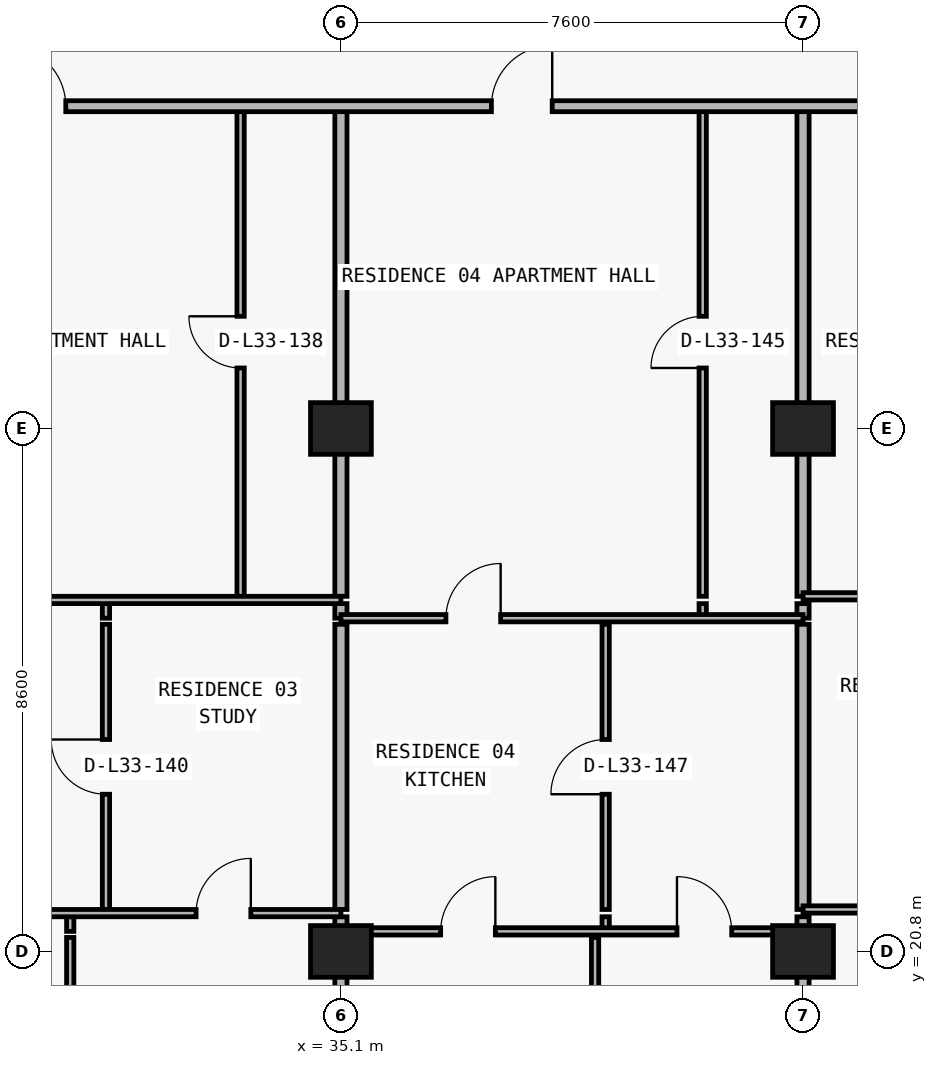
"""IFC4 building model, lengths in metres.
Left out: names, types, materials, properties, quantities, classifications, styles, units other than length and angle.
Written with IfcOpenShell. Run it as: python <this file> out.ifc"""

import sys

from ifc_helpers import new_model, si_unit, direction, frame, frame_2d, origin, origin_2d, place, context, subcontext, project, spatial, rectangle, extrude, element, fill, save


model = new_model("IFC4")
c1 = context("Model", 3, precision=1e-05, world=origin(), true_north=direction((0.0, 1.0)))
c2 = subcontext(c1, "Body", "Model", "MODEL_VIEW")
j1 = project(units=[si_unit("LENGTHUNIT", "METRE"), si_unit("PLANEANGLEUNIT", "RADIAN")], contexts=[c1])
p1 = place(None, origin())
s1 = spatial("IfcSite", under=j1, at=p1, CompositionType="ELEMENT")
p2 = place(p1, origin())
s2 = spatial("IfcBuilding", under=s1, at=p2, CompositionType="ELEMENT")
p3 = place(p2, frame((0.0, 0.0, 122.4)))
s3 = spatial("IfcBuildingStorey", under=s2, at=p3, CompositionType="ELEMENT", Elevation=122.4)
for number, where, z_axis, x_axis in (
    (1, (35.1, 20.8, 0.0), (0.0, 0.0, 1.0), (1.0, 0.0, 0.0)),
    (2, (42.7, 20.8, 0.0), (0.0, 0.0, 1.0), (1.0, 0.0, 0.0)),
    (3, (35.1, 29.4, 0.0), (0.0, 0.0, 1.0), (1.0, 0.0, 0.0)),
    (4, (42.7, 29.4, 0.0), (0.0, 0.0, 1.0), (1.0, 0.0, 0.0)),
):
    element("IfcColumn", number, at=place(p3, frame(where, z_axis=z_axis, x_axis=x_axis)), inside=s3, PredefinedType="COLUMN", context=c2, shape_type="SweptSolid", body=[
        extrude(rectangle(XDim=1.0, YDim=0.85, at=origin_2d()), origin(), (0.0, 0.0, 1.0), 3.05),
    ])
p4 = place(p3, frame((30.648, 8.84, 0.0), z_axis=(0.0, 0.0, 1.0), x_axis=(0.0, 1.0, 0.0)))
e5 = element("IfcWall", 5, at=p4, inside=s3, PredefinedType="PARTITIONING", context=c2, shape_type="SweptSolid", body=[
    extrude(rectangle(XDim=12.19, YDim=0.12, at=frame_2d((6.095, 0.0))), origin(), (0.0, 0.0, 1.0), 3.05),
])
p5 = place(p3, frame((30.648, 21.13, 0.0), z_axis=(0.0, 0.0, 1.0), x_axis=(0.0, 1.0, 0.0)))
e6 = element("IfcWall", 6, at=p5, inside=s3, PredefinedType="PARTITIONING", context=c2, shape_type="SweptSolid", body=[
    extrude(rectangle(XDim=0.24, YDim=0.12, at=frame_2d((0.12, 0.0))), origin(), (0.0, 0.0, 1.0), 3.05),
])
p6 = place(p3, frame((31.236, 21.49, 0.0), z_axis=(0.0, 0.0, 1.0), x_axis=(0.0, 1.0, 0.0)))
e7 = element("IfcWall", 7, at=p6, inside=s3, PredefinedType="PARTITIONING", context=c2, shape_type="SweptSolid", body=[
    extrude(rectangle(XDim=4.69, YDim=0.12, at=frame_2d((2.345, 0.0))), origin(), (0.0, 0.0, 1.0), 3.05),
])
p7 = place(p6, frame((1.895, 0.0, 0.0)))
e8 = element("IfcOpeningElement", 8, at=p7, cuts=e7, PredefinedType="OPENING", context=c2, shape_type="SweptSolid", body=[
    extrude(rectangle(XDim=0.9, YDim=2.15, at=frame_2d((0.45, 1.075))), frame((0.0, 0.07, 0.0), z_axis=(0.0, -1.0, 0.0), x_axis=(1.0, 0.0, 0.0)), (0.0, 0.0, 1.0), 0.14),
])
p8 = place(p3, frame((31.236, 26.28, 0.0), z_axis=(0.0, 0.0, 1.0), x_axis=(0.0, 1.0, 0.0)))
e9 = element("IfcWall", 9, at=p8, inside=s3, PredefinedType="PARTITIONING", context=c2, shape_type="SweptSolid", body=[
    extrude(rectangle(XDim=0.24, YDim=0.12, at=frame_2d((0.12, 0.0))), origin(), (0.0, 0.0, 1.0), 3.05),
])
p9 = place(p3, frame((33.45, 26.64, 0.0), z_axis=(0.0, 0.0, 1.0), x_axis=(0.0, 1.0, 0.0)))
e10 = element("IfcWall", 10, at=p9, inside=s3, PredefinedType="PARTITIONING", context=c2, shape_type="SweptSolid", body=[
    extrude(rectangle(XDim=8.06, YDim=0.12, at=frame_2d((4.03, 0.0))), origin(), (0.0, 0.0, 1.0), 3.05),
])
p10 = place(p9, frame((3.755, 0.0, 0.0)))
e11 = element("IfcOpeningElement", 11, at=p10, cuts=e10, PredefinedType="OPENING", context=c2, shape_type="SweptSolid", body=[
    extrude(rectangle(XDim=0.85, YDim=2.1, at=frame_2d((0.425, 1.05))), frame((0.0, 0.07, 0.0), z_axis=(0.0, -1.0, 0.0), x_axis=(1.0, 0.0, 0.0)), (0.0, 0.0, 1.0), 0.14),
])
p11 = place(p3, frame((35.1, 8.84, 0.0), z_axis=(0.0, 0.0, 1.0), x_axis=(0.0, 1.0, 0.0)))
e12 = element("IfcWall", 12, at=p11, inside=s3, PredefinedType="PARTITIONING", context=c2, shape_type="SweptSolid", body=[
    extrude(rectangle(XDim=12.19, YDim=0.2, at=frame_2d((6.095, 0.0))), origin(), (0.0, 0.0, 1.0), 2.174),
])
p12 = place(p3, frame((35.1, 21.13, 0.0), z_axis=(0.0, 0.0, 1.0), x_axis=(0.0, 1.0, 0.0)))
e13 = element("IfcWall", 13, at=p12, inside=s3, PredefinedType="PARTITIONING", context=c2, shape_type="SweptSolid", body=[
    extrude(rectangle(XDim=0.24, YDim=0.2, at=frame_2d((0.12, 0.0))), origin(), (0.0, 0.0, 1.0), 2.174),
])
p13 = place(p3, frame((35.1, 21.49, 0.0), z_axis=(0.0, 0.0, 1.0), x_axis=(0.0, 1.0, 0.0)))
e14 = element("IfcWall", 14, at=p13, inside=s3, PredefinedType="PARTITIONING", context=c2, shape_type="SweptSolid", body=[
    extrude(rectangle(XDim=4.69, YDim=0.2, at=frame_2d((2.345, 0.0))), origin(), (0.0, 0.0, 1.0), 2.174),
])
p14 = place(p3, frame((35.1, 26.28, 0.0), z_axis=(0.0, 0.0, 1.0), x_axis=(0.0, 1.0, 0.0)))
e15 = element("IfcWall", 15, at=p14, inside=s3, PredefinedType="PARTITIONING", context=c2, shape_type="SweptSolid", body=[
    extrude(rectangle(XDim=0.24, YDim=0.2, at=frame_2d((0.12, 0.0))), origin(), (0.0, 0.0, 1.0), 2.174),
])
p15 = place(p3, frame((35.1, 26.64, 0.0), z_axis=(0.0, 0.0, 1.0), x_axis=(0.0, 1.0, 0.0)))
e16 = element("IfcWall", 16, at=p15, inside=s3, PredefinedType="PARTITIONING", context=c2, shape_type="SweptSolid", body=[
    extrude(rectangle(XDim=8.06, YDim=0.2, at=frame_2d((4.03, 0.0))), origin(), (0.0, 0.0, 1.0), 2.174),
])
p16 = place(p3, frame((39.28, 8.84, 0.0), z_axis=(0.0, 0.0, 1.0), x_axis=(0.0, 1.0, 0.0)))
e17 = element("IfcWall", 17, at=p16, inside=s3, PredefinedType="PARTITIONING", context=c2, shape_type="SweptSolid", body=[
    extrude(rectangle(XDim=12.19, YDim=0.12, at=frame_2d((6.095, 0.0))), origin(), (0.0, 0.0, 1.0), 3.05),
])
p17 = place(p3, frame((39.454, 21.13, 0.0), z_axis=(0.0, 0.0, 1.0), x_axis=(0.0, 1.0, 0.0)))
e18 = element("IfcWall", 18, at=p17, inside=s3, PredefinedType="PARTITIONING", context=c2, shape_type="SweptSolid", body=[
    extrude(rectangle(XDim=0.24, YDim=0.12, at=frame_2d((0.12, 0.0))), origin(), (0.0, 0.0, 1.0), 3.05),
])
p18 = place(p3, frame((39.454, 21.49, 0.0), z_axis=(0.0, 0.0, 1.0), x_axis=(0.0, 1.0, 0.0)))
e19 = element("IfcWall", 19, at=p18, inside=s3, PredefinedType="PARTITIONING", context=c2, shape_type="SweptSolid", body=[
    extrude(rectangle(XDim=4.69, YDim=0.12, at=frame_2d((2.345, 0.0))), origin(), (0.0, 0.0, 1.0), 3.05),
])
p19 = place(p18, frame((1.895, 0.0, 0.0)))
e20 = element("IfcOpeningElement", 20, at=p19, cuts=e19, PredefinedType="OPENING", context=c2, shape_type="SweptSolid", body=[
    extrude(rectangle(XDim=0.9, YDim=2.15, at=frame_2d((0.45, 1.075))), frame((0.0, 0.07, 0.0), z_axis=(0.0, -1.0, 0.0), x_axis=(1.0, 0.0, 0.0)), (0.0, 0.0, 1.0), 0.14),
])
p20 = place(p3, frame((41.05, 26.28, 0.0), z_axis=(0.0, 0.0, 1.0), x_axis=(0.0, 1.0, 0.0)))
e21 = element("IfcWall", 21, at=p20, inside=s3, PredefinedType="PARTITIONING", context=c2, shape_type="SweptSolid", body=[
    extrude(rectangle(XDim=0.24, YDim=0.12, at=frame_2d((0.12, 0.0))), origin(), (0.0, 0.0, 1.0), 2.679),
])
p21 = place(p3, frame((41.05, 26.64, 0.0), z_axis=(0.0, 0.0, 1.0), x_axis=(0.0, 1.0, 0.0)))
e22 = element("IfcWall", 22, at=p21, inside=s3, PredefinedType="PARTITIONING", context=c2, shape_type="SweptSolid", body=[
    extrude(rectangle(XDim=8.06, YDim=0.12, at=frame_2d((4.03, 0.0))), origin(), (0.0, 0.0, 1.0), 2.679),
])
p22 = place(p21, frame((3.755, 0.0, 0.0)))
e23 = element("IfcOpeningElement", 23, at=p22, cuts=e22, PredefinedType="OPENING", context=c2, shape_type="SweptSolid", body=[
    extrude(rectangle(XDim=0.85, YDim=2.1, at=frame_2d((0.425, 1.05))), frame((0.0, 0.07, 0.0), z_axis=(0.0, -1.0, 0.0), x_axis=(1.0, 0.0, 0.0)), (0.0, 0.0, 1.0), 0.14),
])
p23 = place(p3, frame((42.7, 8.84, 0.0), z_axis=(0.0, 0.0, 1.0), x_axis=(0.0, 1.0, 0.0)))
e24 = element("IfcWall", 24, at=p23, inside=s3, PredefinedType="PARTITIONING", context=c2, shape_type="SweptSolid", body=[
    extrude(rectangle(XDim=12.19, YDim=0.2, at=frame_2d((6.095, 0.0))), origin(), (0.0, 0.0, 1.0), 2.174),
])
p24 = place(p3, frame((42.7, 21.13, 0.0), z_axis=(0.0, 0.0, 1.0), x_axis=(0.0, 1.0, 0.0)))
e25 = element("IfcWall", 25, at=p24, inside=s3, PredefinedType="PARTITIONING", context=c2, shape_type="SweptSolid", body=[
    extrude(rectangle(XDim=0.24, YDim=0.2, at=frame_2d((0.12, 0.0))), origin(), (0.0, 0.0, 1.0), 2.174),
])
p25 = place(p3, frame((42.7, 21.49, 0.0), z_axis=(0.0, 0.0, 1.0), x_axis=(0.0, 1.0, 0.0)))
e26 = element("IfcWall", 26, at=p25, inside=s3, PredefinedType="PARTITIONING", context=c2, shape_type="SweptSolid", body=[
    extrude(rectangle(XDim=4.69, YDim=0.2, at=frame_2d((2.345, 0.0))), origin(), (0.0, 0.0, 1.0), 2.174),
])
p26 = place(p3, frame((42.7, 26.28, 0.0), z_axis=(0.0, 0.0, 1.0), x_axis=(0.0, 1.0, 0.0)))
e27 = element("IfcWall", 27, at=p26, inside=s3, PredefinedType="PARTITIONING", context=c2, shape_type="SweptSolid", body=[
    extrude(rectangle(XDim=0.24, YDim=0.2, at=frame_2d((0.12, 0.0))), origin(), (0.0, 0.0, 1.0), 2.174),
])
p27 = place(p3, frame((42.7, 26.64, 0.0), z_axis=(0.0, 0.0, 1.0), x_axis=(0.0, 1.0, 0.0)))
e28 = element("IfcWall", 28, at=p27, inside=s3, PredefinedType="PARTITIONING", context=c2, shape_type="SweptSolid", body=[
    extrude(rectangle(XDim=8.06, YDim=0.2, at=frame_2d((4.03, 0.0))), origin(), (0.0, 0.0, 1.0), 2.174),
])
p28 = place(p3, frame((35.1, 21.13, 0.0), z_axis=(0.0, 0.0, 1.0), x_axis=(1.0, 0.0, 0.0)))
e29 = element("IfcWall", 29, at=p28, inside=s3, PredefinedType="PARTITIONING", context=c2, shape_type="SweptSolid", body=[
    extrude(rectangle(XDim=7.6, YDim=0.12, at=frame_2d((3.8, 0.0))), origin(), (0.0, 0.0, 1.0), 2.174),
])
p29 = place(p28, frame((1.64, 0.0, 0.0)))
e30 = element("IfcOpeningElement", 30, at=p29, cuts=e29, PredefinedType="OPENING", context=c2, shape_type="SweptSolid", body=[
    extrude(rectangle(XDim=0.9, YDim=2.124, at=frame_2d((0.45, 1.062))), frame((0.0, 0.07, 0.0), z_axis=(0.0, -1.0, 0.0), x_axis=(1.0, 0.0, 0.0)), (0.0, 0.0, 1.0), 0.14),
])
p30 = place(p28, frame((5.527, 0.0, 0.0)))
e31 = element("IfcOpeningElement", 31, at=p30, cuts=e29, PredefinedType="OPENING", context=c2, shape_type="SweptSolid", body=[
    extrude(rectangle(XDim=0.9, YDim=2.124, at=frame_2d((0.45, 1.062))), frame((0.0, 0.07, 0.0), z_axis=(0.0, -1.0, 0.0), x_axis=(1.0, 0.0, 0.0)), (0.0, 0.0, 1.0), 0.14),
])
p31 = place(p3, frame((26.92, 21.43, 0.0), z_axis=(0.0, 0.0, 1.0), x_axis=(1.0, 0.0, 0.0)))
e32 = element("IfcWall", 32, at=p31, inside=s3, PredefinedType="PARTITIONING", context=c2, shape_type="SweptSolid", body=[
    extrude(rectangle(XDim=8.18, YDim=0.12, at=frame_2d((4.09, 0.0))), origin(), (0.0, 0.0, 1.0), 3.05),
])
p32 = place(p31, frame((1.414, 0.0, 0.0)))
e33 = element("IfcOpeningElement", 33, at=p32, cuts=e32, PredefinedType="OPENING", context=c2, shape_type="SweptSolid", body=[
    extrude(rectangle(XDim=0.9, YDim=2.15, at=frame_2d((0.45, 1.075))), frame((0.0, 0.07, 0.0), z_axis=(0.0, -1.0, 0.0), x_axis=(1.0, 0.0, 0.0)), (0.0, 0.0, 1.0), 0.14),
])
p33 = place(p31, frame((5.798, 0.0, 0.0)))
e34 = element("IfcOpeningElement", 34, at=p33, cuts=e32, PredefinedType="OPENING", context=c2, shape_type="SweptSolid", body=[
    extrude(rectangle(XDim=0.9, YDim=2.15, at=frame_2d((0.45, 1.075))), frame((0.0, 0.07, 0.0), z_axis=(0.0, -1.0, 0.0), x_axis=(1.0, 0.0, 0.0)), (0.0, 0.0, 1.0), 0.14),
])
p34 = place(p3, frame((42.7, 21.49, 0.0), z_axis=(0.0, 0.0, 1.0), x_axis=(1.0, 0.0, 0.0)))
e35 = element("IfcWall", 35, at=p34, inside=s3, PredefinedType="PARTITIONING", context=c2, shape_type="SweptSolid", body=[
    extrude(rectangle(XDim=8.18, YDim=0.12, at=frame_2d((4.09, 0.0))), origin(), (0.0, 0.0, 1.0), 3.05),
])
p35 = place(p34, frame((1.524, 0.0, 0.0)))
e36 = element("IfcOpeningElement", 36, at=p35, cuts=e35, PredefinedType="OPENING", context=c2, shape_type="SweptSolid", body=[
    extrude(rectangle(XDim=0.9, YDim=2.15, at=frame_2d((0.45, 1.075))), frame((0.0, 0.07, 0.0), z_axis=(0.0, -1.0, 0.0), x_axis=(1.0, 0.0, 0.0)), (0.0, 0.0, 1.0), 0.14),
])
p36 = place(p34, frame((5.783, 0.0, 0.0)))
e37 = element("IfcOpeningElement", 37, at=p36, cuts=e35, PredefinedType="OPENING", context=c2, shape_type="SweptSolid", body=[
    extrude(rectangle(XDim=0.9, YDim=2.15, at=frame_2d((0.45, 1.075))), frame((0.0, 0.07, 0.0), z_axis=(0.0, -1.0, 0.0), x_axis=(1.0, 0.0, 0.0)), (0.0, 0.0, 1.0), 0.14),
])
p37 = place(p3, frame((35.1, 26.28, 0.0), z_axis=(0.0, 0.0, 1.0), x_axis=(1.0, 0.0, 0.0)))
e38 = element("IfcWall", 38, at=p37, inside=s3, PredefinedType="PARTITIONING", context=c2, shape_type="SweptSolid", body=[
    extrude(rectangle(XDim=7.6, YDim=0.12, at=frame_2d((3.8, 0.0))), origin(), (0.0, 0.0, 1.0), 3.05),
])
p38 = place(p37, frame((1.727, 0.0, 0.0)))
e39 = element("IfcOpeningElement", 39, at=p38, cuts=e38, PredefinedType="OPENING", context=c2, shape_type="SweptSolid", body=[
    extrude(rectangle(XDim=0.9, YDim=2.15, at=frame_2d((0.45, 1.075))), frame((0.0, 0.07, 0.0), z_axis=(0.0, -1.0, 0.0), x_axis=(1.0, 0.0, 0.0)), (0.0, 0.0, 1.0), 0.14),
])
p39 = place(p3, frame((26.92, 26.58, 0.0), z_axis=(0.0, 0.0, 1.0), x_axis=(1.0, 0.0, 0.0)))
e40 = element("IfcWall", 40, at=p39, inside=s3, PredefinedType="PARTITIONING", context=c2, shape_type="SweptSolid", body=[
    extrude(rectangle(XDim=8.18, YDim=0.12, at=frame_2d((4.09, 0.0))), origin(), (0.0, 0.0, 1.0), 3.05),
])
p40 = place(p39, frame((1.708, 0.0, 0.0)))
e41 = element("IfcOpeningElement", 41, at=p40, cuts=e40, PredefinedType="OPENING", context=c2, shape_type="SweptSolid", body=[
    extrude(rectangle(XDim=0.9, YDim=2.15, at=frame_2d((0.45, 1.075))), frame((0.0, 0.07, 0.0), z_axis=(0.0, -1.0, 0.0), x_axis=(1.0, 0.0, 0.0)), (0.0, 0.0, 1.0), 0.14),
])
p41 = place(p3, frame((42.7, 26.64, 0.0), z_axis=(0.0, 0.0, 1.0), x_axis=(1.0, 0.0, 0.0)))
e42 = element("IfcWall", 42, at=p41, inside=s3, PredefinedType="PARTITIONING", context=c2, shape_type="SweptSolid", body=[
    extrude(rectangle(XDim=8.18, YDim=0.12, at=frame_2d((4.09, 0.0))), origin(), (0.0, 0.0, 1.0), 3.05),
])
p42 = place(p41, frame((1.693, 0.0, 0.0)))
e43 = element("IfcOpeningElement", 43, at=p42, cuts=e42, PredefinedType="OPENING", context=c2, shape_type="SweptSolid", body=[
    extrude(rectangle(XDim=0.9, YDim=2.15, at=frame_2d((0.45, 1.075))), frame((0.0, 0.07, 0.0), z_axis=(0.0, -1.0, 0.0), x_axis=(1.0, 0.0, 0.0)), (0.0, 0.0, 1.0), 0.14),
])
p43 = place(p3, frame((18.3, 34.7, 0.0), z_axis=(0.0, 0.0, 1.0), x_axis=(1.0, 0.0, 0.0)))
e44 = element("IfcWall", 44, at=p43, inside=s3, PredefinedType="PARTITIONING", context=c2, shape_type="SweptSolid", body=[
    extrude(rectangle(XDim=41.2, YDim=0.18, at=frame_2d((20.6, 0.0))), origin(), (0.0, 0.0, 1.0), 3.05),
])
p44 = place(p43, frame((2.875, 0.0, 0.0)))
e45 = element("IfcOpeningElement", 45, at=p44, cuts=e44, PredefinedType="OPENING", context=c2, shape_type="SweptSolid", body=[
    extrude(rectangle(XDim=1.0, YDim=2.2, at=frame_2d((0.5, 1.1))), frame((0.0, 0.1, 0.0), z_axis=(0.0, -1.0, 0.0), x_axis=(1.0, 0.0, 0.0)), (0.0, 0.0, 1.0), 0.2),
])
p45 = place(p43, frame((11.275, 0.0, 0.0)))
e46 = element("IfcOpeningElement", 46, at=p45, cuts=e44, PredefinedType="OPENING", context=c2, shape_type="SweptSolid", body=[
    extrude(rectangle(XDim=1.0, YDim=2.2, at=frame_2d((0.5, 1.1))), frame((0.0, 0.1, 0.0), z_axis=(0.0, -1.0, 0.0), x_axis=(1.0, 0.0, 0.0)), (0.0, 0.0, 1.0), 0.2),
])
p46 = place(p43, frame((19.275, 0.0, 0.0)))
e47 = element("IfcOpeningElement", 47, at=p46, cuts=e44, PredefinedType="OPENING", context=c2, shape_type="SweptSolid", body=[
    extrude(rectangle(XDim=1.0, YDim=2.2, at=frame_2d((0.5, 1.1))), frame((0.0, 0.1, 0.0), z_axis=(0.0, -1.0, 0.0), x_axis=(1.0, 0.0, 0.0)), (0.0, 0.0, 1.0), 0.2),
])
p47 = place(p43, frame((27.275, 0.0, 0.0)))
e48 = element("IfcOpeningElement", 48, at=p47, cuts=e44, PredefinedType="OPENING", context=c2, shape_type="SweptSolid", body=[
    extrude(rectangle(XDim=1.0, YDim=2.2, at=frame_2d((0.5, 1.1))), frame((0.0, 0.1, 0.0), z_axis=(0.0, -1.0, 0.0), x_axis=(1.0, 0.0, 0.0)), (0.0, 0.0, 1.0), 0.2),
])
p48 = place(p43, frame((35.675, 0.0, 0.0)))
e49 = element("IfcOpeningElement", 49, at=p48, cuts=e44, PredefinedType="OPENING", context=c2, shape_type="SweptSolid", body=[
    extrude(rectangle(XDim=1.0, YDim=2.2, at=frame_2d((0.5, 1.1))), frame((0.0, 0.1, 0.0), z_axis=(0.0, -1.0, 0.0), x_axis=(1.0, 0.0, 0.0)), (0.0, 0.0, 1.0), 0.2),
])
p49 = place(p45, origin())
e50 = element("IfcDoor", 50, at=p49, inside=s3, OperationType="SINGLE_SWING_LEFT", PredefinedType="DOOR", context=c2, shape_type="SweptSolid", body=[
    extrude(rectangle(XDim=1.0, YDim=2.2, at=frame_2d((0.5, 1.1))), frame((0.0, 0.025, 0.0), z_axis=(0.0, -1.0, 0.0), x_axis=(1.0, 0.0, 0.0)), (0.0, 0.0, 1.0), 0.05),
])
fill(e46, e50)
p50 = place(p10, origin())
e51 = element("IfcDoor", 51, at=p50, inside=s3, OperationType="SINGLE_SWING_RIGHT", PredefinedType="DOOR", context=c2, shape_type="SweptSolid", body=[
    extrude(rectangle(XDim=0.85, YDim=2.1, at=frame_2d((0.425, 1.05))), frame((0.0, 0.025, 0.0), z_axis=(0.0, -1.0, 0.0), x_axis=(1.0, 0.0, 0.0)), (0.0, 0.0, 1.0), 0.05),
])
fill(e11, e51)
p51 = place(p7, origin())
e52 = element("IfcDoor", 52, at=p51, inside=s3, OperationType="SINGLE_SWING_RIGHT", PredefinedType="DOOR", context=c2, shape_type="SweptSolid", body=[
    extrude(rectangle(XDim=0.9, YDim=2.15, at=frame_2d((0.45, 1.075))), frame((0.0, 0.025, 0.0), z_axis=(0.0, -1.0, 0.0), x_axis=(1.0, 0.0, 0.0)), (0.0, 0.0, 1.0), 0.05),
])
fill(e8, e52)
p52 = place(p33, origin())
e53 = element("IfcDoor", 53, at=p52, inside=s3, OperationType="SINGLE_SWING_RIGHT", PredefinedType="DOOR", context=c2, shape_type="SweptSolid", body=[
    extrude(rectangle(XDim=0.9, YDim=2.15, at=frame_2d((0.45, 1.075))), frame((0.0, 0.025, 0.0), z_axis=(0.0, -1.0, 0.0), x_axis=(1.0, 0.0, 0.0)), (0.0, 0.0, 1.0), 0.05),
])
fill(e34, e53)
p53 = place(p46, origin())
e54 = element("IfcDoor", 54, at=p53, inside=s3, OperationType="SINGLE_SWING_RIGHT", PredefinedType="DOOR", context=c2, shape_type="SweptSolid", body=[
    extrude(rectangle(XDim=1.0, YDim=2.2, at=frame_2d((0.5, 1.1))), frame((0.0, 0.025, 0.0), z_axis=(0.0, -1.0, 0.0), x_axis=(1.0, 0.0, 0.0)), (0.0, 0.0, 1.0), 0.05),
])
fill(e47, e54)
p54 = place(p22, origin())
e55 = element("IfcDoor", 55, at=p54, inside=s3, OperationType="SINGLE_SWING_LEFT", PredefinedType="DOOR", context=c2, shape_type="SweptSolid", body=[
    extrude(rectangle(XDim=0.85, YDim=2.1, at=frame_2d((0.425, 1.05))), frame((0.0, 0.025, 0.0), z_axis=(0.0, -1.0, 0.0), x_axis=(1.0, 0.0, 0.0)), (0.0, 0.0, 1.0), 0.05),
])
fill(e23, e55)
p55 = place(p38, origin())
e56 = element("IfcDoor", 56, at=p55, inside=s3, OperationType="SINGLE_SWING_RIGHT", PredefinedType="DOOR", context=c2, shape_type="SweptSolid", body=[
    extrude(rectangle(XDim=0.9, YDim=2.15, at=frame_2d((0.45, 1.075))), frame((0.0, 0.025, 0.0), z_axis=(0.0, -1.0, 0.0), x_axis=(1.0, 0.0, 0.0)), (0.0, 0.0, 1.0), 0.05),
])
fill(e39, e56)
p56 = place(p19, origin())
e57 = element("IfcDoor", 57, at=p56, inside=s3, OperationType="SINGLE_SWING_LEFT", PredefinedType="DOOR", context=c2, shape_type="SweptSolid", body=[
    extrude(rectangle(XDim=0.9, YDim=2.15, at=frame_2d((0.45, 1.075))), frame((0.0, 0.025, 0.0), z_axis=(0.0, -1.0, 0.0), x_axis=(1.0, 0.0, 0.0)), (0.0, 0.0, 1.0), 0.05),
])
fill(e20, e57)
p57 = place(p29, origin())
e58 = element("IfcDoor", 58, at=p57, inside=s3, OperationType="SINGLE_SWING_RIGHT", PredefinedType="DOOR", context=c2, shape_type="SweptSolid", body=[
    extrude(rectangle(XDim=0.9, YDim=2.124, at=frame_2d((0.45, 1.062))), frame((0.0, 0.025, 0.0), z_axis=(0.0, -1.0, 0.0), x_axis=(1.0, 0.0, 0.0)), (0.0, 0.0, 1.0), 0.05),
])
fill(e30, e58)
p58 = place(p30, origin())
e59 = element("IfcDoor", 59, at=p58, inside=s3, OperationType="SINGLE_SWING_LEFT", PredefinedType="DOOR", context=c2, shape_type="SweptSolid", body=[
    extrude(rectangle(XDim=0.9, YDim=2.124, at=frame_2d((0.45, 1.062))), frame((0.0, 0.025, 0.0), z_axis=(0.0, -1.0, 0.0), x_axis=(1.0, 0.0, 0.0)), (0.0, 0.0, 1.0), 0.05),
])
fill(e31, e59)
save(model, sys.argv[1])
